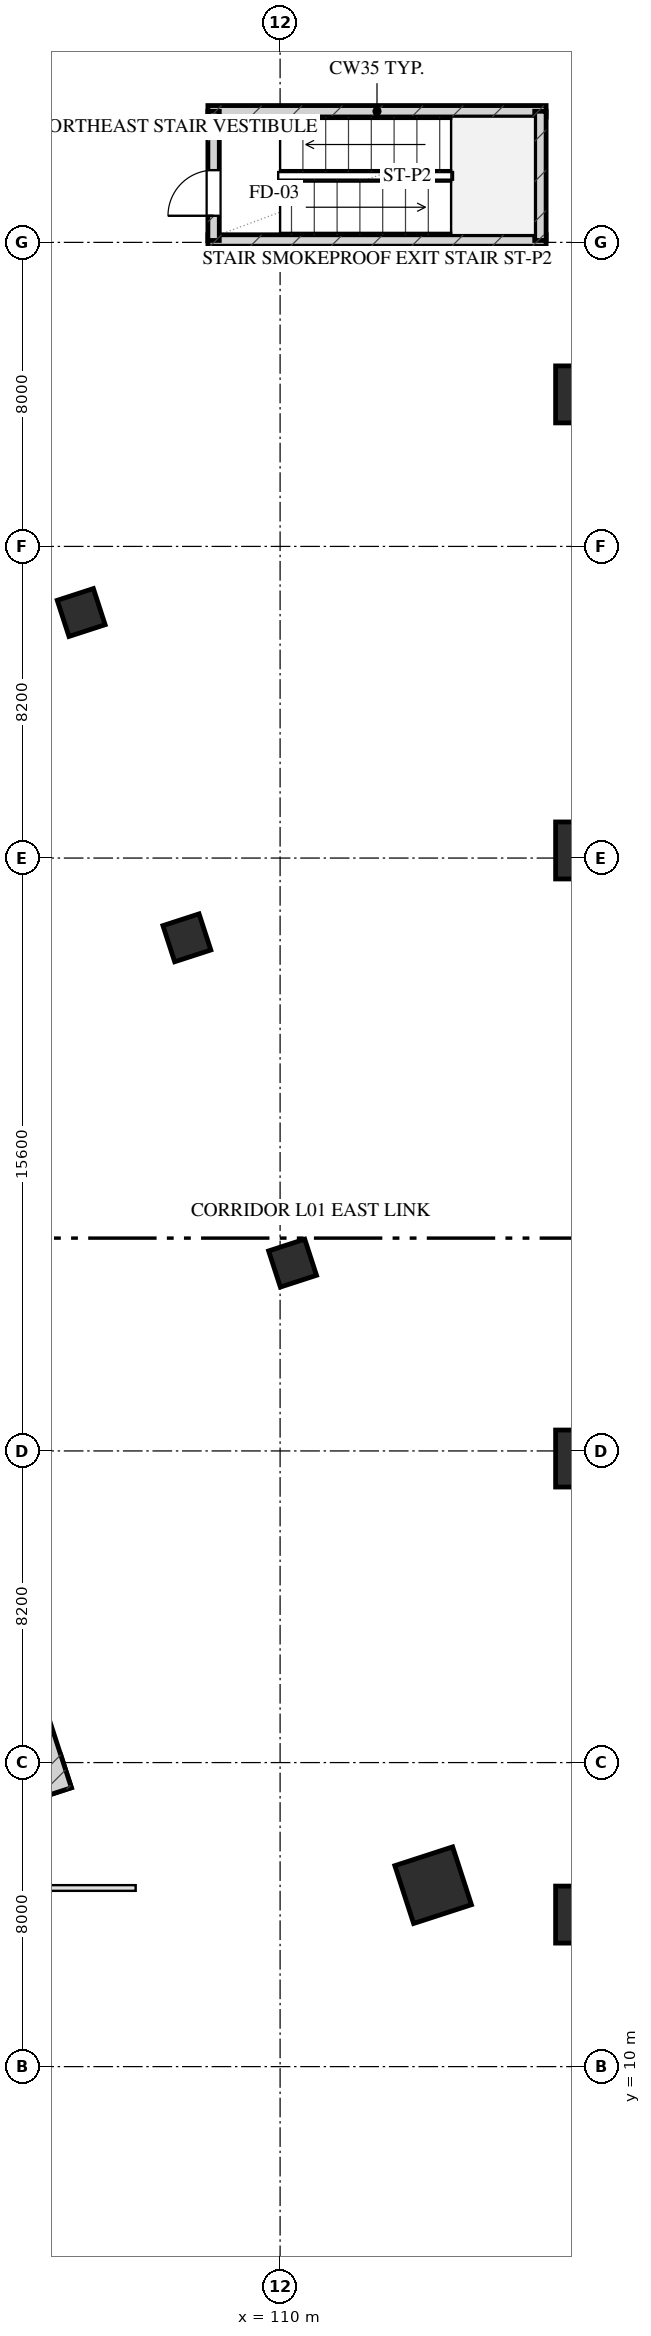
"""IFC4 building model, lengths in metres.
Left out: names, types, materials, properties, quantities, classifications, styles, units other than length and angle.
Written with IfcOpenShell. Run it as: python <this file> out.ifc"""

import sys

from ifc_helpers import new_model, si_unit, direction, frame, frame_2d, origin, origin_2d, place, context, subcontext, project, spatial, rectangle, hollow_rectangle, extrude, element, fill, save


model = new_model("IFC4")
c1 = context("Model", 3, precision=1e-05, world=origin(), true_north=direction((0.0, 1.0)))
c2 = subcontext(c1, "Body", "Model", "MODEL_VIEW")
j1 = project(units=[si_unit("LENGTHUNIT", "METRE"), si_unit("PLANEANGLEUNIT", "RADIAN")], contexts=[c1])
p1 = place(None, origin())
s1 = spatial("IfcSite", under=j1, at=p1, CompositionType="ELEMENT")
p2 = place(p1, origin())
s2 = spatial("IfcBuilding", under=s1, at=p2, CompositionType="ELEMENT")
p3 = place(p2, frame((0.0, 0.0, 6.0)))
s3 = spatial("IfcBuildingStorey", under=s2, at=p3, CompositionType="ELEMENT", Elevation=6.0)
p4 = place(p3, frame((88.487, 12.605, 0.0), z_axis=(0.0, 0.0, 1.0), x_axis=(0.951055016115, 0.309021611416, 0.0)))
e1 = element("IfcWall", 1, at=p4, inside=s3, PredefinedType="SHEAR", context=c2, shape_type="SweptSolid", body=[
    extrude(rectangle(XDim=16.7, YDim=0.9, at=frame_2d((8.35, 0.0))), origin(), (0.0, 0.0, 1.0), 5.5),
])
p5 = place(p3, frame((101.059, 26.5, 0.0), z_axis=(0.0, 0.0, 1.0), x_axis=(0.309021722829, -0.951054979914, 0.0)))
e2 = element("IfcWall", 2, at=p5, inside=s3, PredefinedType="SHEAR", context=c2, shape_type="SweptSolid", body=[
    extrude(rectangle(XDim=9.78, YDim=0.9, at=frame_2d((4.89, 0.0))), origin(), (0.0, 0.0, 1.0), 5.5),
])
for number, where, z_axis, x_axis in (
    (3, (108.1, 58.05, 0.0), (0.0, 0.0, 1.0), (1.0, 0.0, 0.0)),
    (4, (108.1, 61.45, 0.0), (0.0, 0.0, 1.0), (1.0, 0.0, 0.0)),
):
    element("IfcWall", number, at=place(p3, frame(where, z_axis=z_axis, x_axis=x_axis)), inside=s3, PredefinedType="SHEAR", context=c2, shape_type="SweptSolid", body=[
        extrude(rectangle(XDim=8.9, YDim=0.3, at=frame_2d((4.45, 0.0))), origin(), (0.0, 0.0, 1.0), 5.5),
    ])
p6 = place(p3, frame((116.85, 58.05, 0.0), z_axis=(0.0, 0.0, 1.0), x_axis=(0.0, 1.0, 0.0)))
e5 = element("IfcWall", 5, at=p6, inside=s3, PredefinedType="SHEAR", context=c2, shape_type="SweptSolid", body=[
    extrude(rectangle(XDim=3.4, YDim=0.3, at=frame_2d((1.7, 0.0))), origin(), (0.0, 0.0, 1.0), 5.5),
])
p7 = place(p3, frame((108.25, 58.05, 0.0), z_axis=(0.0, 0.0, 1.0), x_axis=(0.0, 1.0, 0.0)))
e6 = element("IfcWall", 6, at=p7, inside=s3, PredefinedType="SHEAR", context=c2, shape_type="SweptSolid", body=[
    extrude(rectangle(XDim=3.4, YDim=0.3, at=frame_2d((1.7, 0.0))), origin(), (0.0, 0.0, 1.0), 5.5),
])
p8 = place(p7, frame((0.65, 0.0, 0.0)))
e7 = element("IfcOpeningElement", 7, at=p8, cuts=e6, PredefinedType="OPENING", context=c2, shape_type="SweptSolid", body=[
    extrude(rectangle(XDim=1.2, YDim=2.05, at=frame_2d((0.6, 1.025))), frame((0.0, 0.16, 0.0), z_axis=(0.0, -1.0, 0.0), x_axis=(1.0, 0.0, 0.0)), (0.0, 0.0, 1.0), 0.32),
])
for number, where, z_axis, x_axis in (
    (8, (118.0, 14.0, 0.0), (0.0, 0.0, 1.0), (1.0, 0.0, 0.0)),
    (9, (118.0, 26.0, 0.0), (0.0, 0.0, 1.0), (1.0, 0.0, 0.0)),
    (10, (118.0, 42.0, 0.0), (0.0, 0.0, 1.0), (1.0, 0.0, 0.0)),
    (11, (118.0, 54.0, 0.0), (0.0, 0.0, 1.0), (1.0, 0.0, 0.0)),
):
    element("IfcColumn", number, at=place(p3, frame(where, z_axis=z_axis, x_axis=x_axis)), inside=s3, PredefinedType="COLUMN", context=c2, shape_type="SweptSolid", body=[
        extrude(rectangle(XDim=1.5, YDim=1.5, at=origin_2d()), origin(), (0.0, 0.0, 1.0), 5.501),
    ])
p9 = place(p3, frame((114.027, 14.774, 0.0), z_axis=(0.0, 0.0, 1.0), x_axis=(0.951056516295, 0.309016994375, 0.0)))
e12 = element("IfcColumn", 12, at=p9, inside=s3, PredefinedType="COLUMN", context=c2, shape_type="SweptSolid", body=[
    extrude(hollow_rectangle(XDim=1.6, YDim=1.6, WallThickness=0.055, at=origin_2d()), origin(), (0.0, 0.0, 1.0), 5.501),
])
for number, where, z_axis, x_axis in (
    (13, (110.328, 31.142, 0.0), (0.0, 0.0, 1.0), (0.951, 0.309, 0.0)),
    (14, (107.547, 39.701, 0.0), (0.0, 0.0, 1.0), (0.951, 0.309, 0.0)),
    (15, (104.766, 48.261, 0.0), (0.0, 0.0, 1.0), (0.951, 0.309, 0.0)),
):
    element("IfcColumn", number, at=place(p3, frame(where, z_axis=z_axis, x_axis=x_axis)), inside=s3, PredefinedType="COLUMN", context=c2, shape_type="SweptSolid", body=[
        extrude(hollow_rectangle(XDim=1.0, YDim=1.0, WallThickness=0.036, at=origin_2d()), origin(), (0.0, 0.0, 1.0), 5.501),
    ])
p10 = place(p3, frame((18.0, 14.7, 0.0), z_axis=(0.0, 0.0, 1.0), x_axis=(1.0, 0.0, 0.0)))
e16 = element("IfcWall", 16, at=p10, inside=s3, PredefinedType="PARTITIONING", context=c2, shape_type="SweptSolid", body=[
    extrude(rectangle(XDim=88.2, YDim=0.15, at=frame_2d((44.1, 0.0))), origin(), (0.0, 0.0, 1.0), 2.325),
])
p11 = place(p10, frame((21.6, 0.0, 0.0)))
e17 = element("IfcOpeningElement", 17, at=p11, cuts=e16, PredefinedType="OPENING", context=c2, shape_type="SweptSolid", body=[
    extrude(rectangle(XDim=1.5, YDim=2.05, at=frame_2d((0.75, 1.025))), frame((0.0, 0.085, 0.0), z_axis=(0.0, -1.0, 0.0), x_axis=(1.0, 0.0, 0.0)), (0.0, 0.0, 1.0), 0.17),
])
p12 = place(p8, origin())
e18 = element("IfcDoor", 18, at=p12, inside=s3, OperationType="SINGLE_SWING_LEFT", PredefinedType="DOOR", context=c2, shape_type="SweptSolid", body=[
    extrude(rectangle(XDim=1.2, YDim=2.05, at=frame_2d((0.6, 1.025))), frame((0.0, 0.025, 0.0), z_axis=(0.0, -1.0, 0.0), x_axis=(1.0, 0.0, 0.0)), (0.0, 0.0, 1.0), 0.05),
])
fill(e7, e18)
save(model, sys.argv[1])
